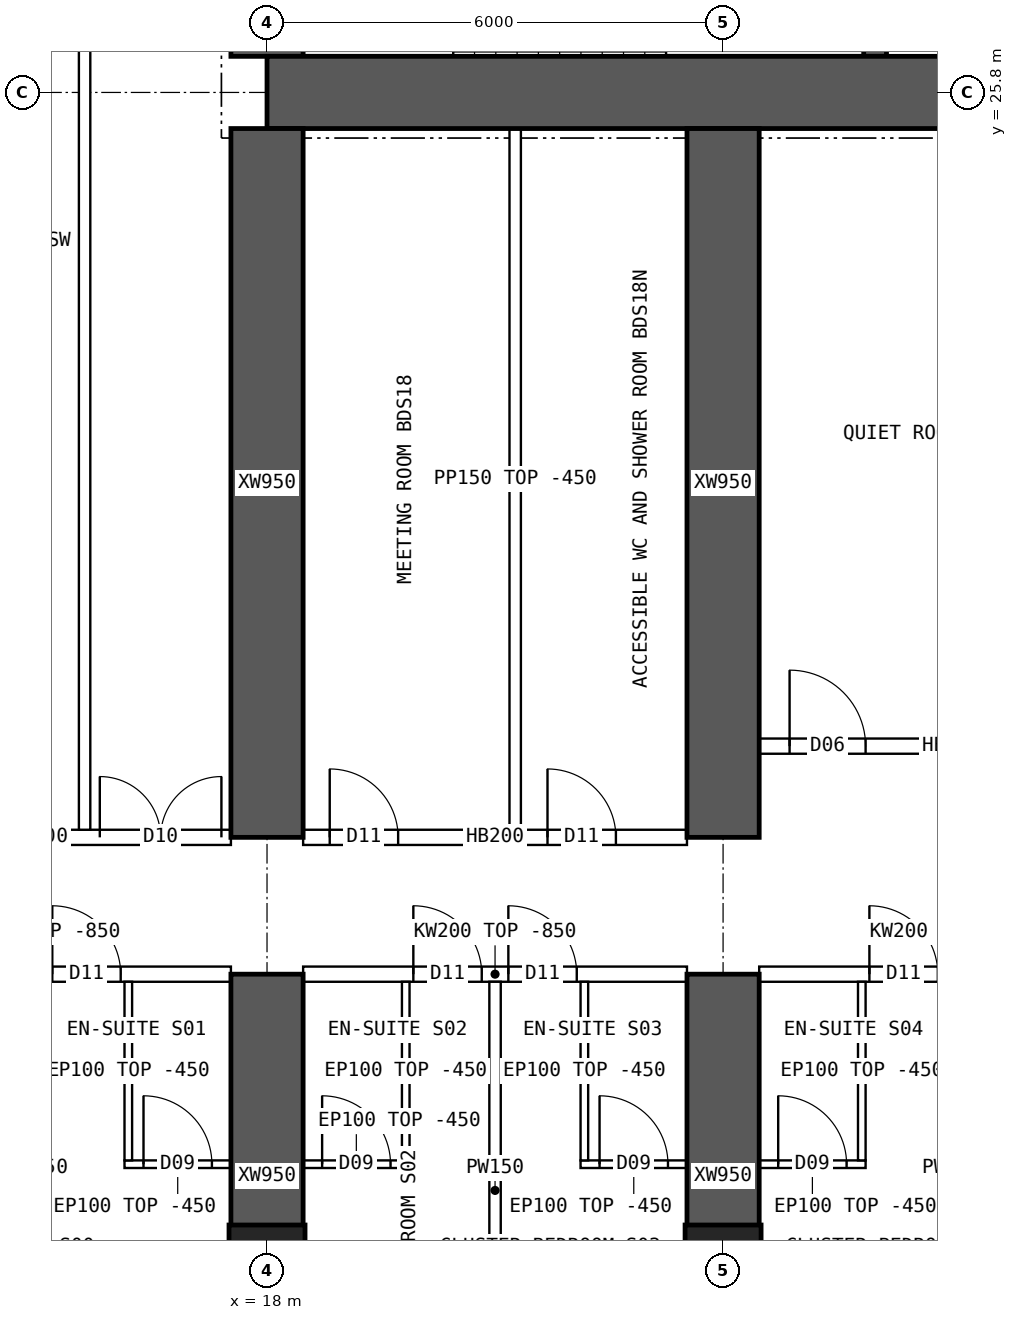
"""IFC4 building model, lengths in metres.
Left out: names, types, materials, properties, quantities, classifications, styles, units other than length and angle.
Written with IfcOpenShell. Run it as: python <this file> out.ifc"""

import sys

from ifc_helpers import new_model, si_unit, direction, frame, frame_2d, origin, origin_2d, place, context, subcontext, project, spatial, polyline, rectangle, hollow_rectangle, outline, extrude, element, fill, save


model = new_model("IFC4")
c1 = context("Model", 3, precision=1e-05, world=origin(), true_north=direction((0.0, 1.0)))
c2 = subcontext(c1, "Body", "Model", "MODEL_VIEW")
j1 = project(units=[si_unit("LENGTHUNIT", "METRE"), si_unit("PLANEANGLEUNIT", "RADIAN")], contexts=[c1])
p1 = place(None, origin())
s1 = spatial("IfcSite", under=j1, at=p1, CompositionType="ELEMENT")
p2 = place(p1, origin())
s2 = spatial("IfcBuilding", under=s1, at=p2, CompositionType="ELEMENT")
p3 = place(p2, frame((0.0, 0.0, 80.65)))
s3 = spatial("IfcBuildingStorey", under=s2, at=p3, CompositionType="ELEMENT", Elevation=80.65)
for number, where, z_axis, x_axis in (
    (1, (18.0, 10.4, 0.0), (0.0, 0.0, 1.0), (1.0, 0.0, 0.0)),
    (2, (24.0, 10.4, 0.0), (0.0, 0.0, 1.0), (1.0, 0.0, 0.0)),
):
    element("IfcColumn", number, at=place(p3, frame(where, z_axis=z_axis, x_axis=x_axis)), inside=s3, PredefinedType="COLUMN", context=c2, shape_type="SweptSolid", body=[
        extrude(hollow_rectangle(XDim=1.0, YDim=1.0, WallThickness=0.1, at=origin_2d()), origin(), (0.0, 0.0, 1.0), 3.75),
    ])
p4 = place(p3, frame((18.0, 25.8, 0.0), z_axis=(0.0, 0.0, 1.0), x_axis=(1.0, 0.0, 0.0)))
e3 = element("IfcWall", 3, at=p4, inside=s3, PredefinedType="SHEAR", context=c2, shape_type="SweptSolid", body=[
    extrude(rectangle(XDim=48.0, YDim=0.95, at=frame_2d((24.0, 0.0))), origin(), (0.0, 0.0, 1.0), 3.75),
])
p5 = place(p3, frame((18.0, 26.275, 0.0), z_axis=(0.0, 0.0, 1.0), x_axis=(0.0, 1.0, 0.0)))
e4 = element("IfcWall", 4, at=p5, inside=s3, PredefinedType="SHEAR", context=c2, shape_type="SweptSolid", body=[
    extrude(rectangle(XDim=11.45, YDim=0.95, at=frame_2d((5.725, 0.0))), origin(), (0.0, 0.0, 1.0), 3.75),
])
p6 = place(p5, frame((5.025, 0.0, 0.0)))
e5 = element("IfcOpeningElement", 5, at=p6, cuts=e4, PredefinedType="OPENING", context=c2, shape_type="SweptSolid", body=[
    extrude(rectangle(XDim=1.2, YDim=2.1, at=frame_2d((0.6, 1.05))), frame((0.0, 0.485, 0.0), z_axis=(0.0, -1.0, 0.0), x_axis=(1.0, 0.0, 0.0)), (0.0, 0.0, 1.0), 0.97),
])
p7 = place(p3, frame((26.0, 26.275, 0.0), z_axis=(0.0, 0.0, 1.0), x_axis=(0.0, 1.0, 0.0)))
e6 = element("IfcWall", 6, at=p7, inside=s3, PredefinedType="SHEAR", context=c2, shape_type="SweptSolid", body=[
    extrude(rectangle(XDim=3.975, YDim=0.3, at=frame_2d((1.988, 0.0))), origin(), (0.0, 0.0, 1.0), 3.75),
])
p8 = place(p3, frame((18.0, 8.9, 0.0), z_axis=(0.0, 0.0, 1.0), x_axis=(0.0, 1.0, 0.0)))
e7 = element("IfcWall", 7, at=p8, inside=s3, PredefinedType="SHEAR", context=c2, shape_type="SweptSolid", body=[
    extrude(rectangle(XDim=5.3, YDim=0.95, at=frame_2d((2.65, 0.0))), origin(), (0.0, 0.0, 1.0), 3.75),
])
p9 = place(p3, frame((18.0, 16.0, 0.0), z_axis=(0.0, 0.0, 1.0), x_axis=(0.0, 1.0, 0.0)))
e8 = element("IfcWall", 8, at=p9, inside=s3, PredefinedType="SHEAR", context=c2, shape_type="SweptSolid", body=[
    extrude(rectangle(XDim=9.325, YDim=0.95, at=frame_2d((4.663, 0.0))), origin(), (0.0, 0.0, 1.0), 3.75),
])
p10 = place(p3, frame((24.0, 8.9, 0.0), z_axis=(0.0, 0.0, 1.0), x_axis=(0.0, 1.0, 0.0)))
e9 = element("IfcWall", 9, at=p10, inside=s3, PredefinedType="SHEAR", context=c2, shape_type="SweptSolid", body=[
    extrude(rectangle(XDim=5.3, YDim=0.95, at=frame_2d((2.65, 0.0))), origin(), (0.0, 0.0, 1.0), 3.75),
])
p11 = place(p3, frame((24.0, 16.0, 0.0), z_axis=(0.0, 0.0, 1.0), x_axis=(0.0, 1.0, 0.0)))
e10 = element("IfcWall", 10, at=p11, inside=s3, PredefinedType="SHEAR", context=c2, shape_type="SweptSolid", body=[
    extrude(rectangle(XDim=9.325, YDim=0.95, at=frame_2d((4.663, 0.0))), origin(), (0.0, 0.0, 1.0), 3.75),
])
p12 = place(p3, frame((12.475, 14.2, 0.0), z_axis=(0.0, 0.0, 1.0), x_axis=(1.0, 0.0, 0.0)))
e11 = element("IfcWall", 11, at=p12, inside=s3, PredefinedType="SOLIDWALL", context=c2, shape_type="SweptSolid", body=[
    extrude(outline(polyline([(0.0, 0.0), (5.05, 0.0), (5.05, 2.9), (0.0, 2.9), (0.0, 0.0)])), frame((0.0, 0.1, 0.0), z_axis=(0.0, -1.0, 0.0), x_axis=(1.0, 0.0, 0.0)), (0.0, 0.0, 1.0), 0.2),
])
p13 = place(p12, frame((1.45, 0.0, 0.0)))
e12 = element("IfcOpeningElement", 12, at=p13, cuts=e11, PredefinedType="OPENING", context=c2, shape_type="SweptSolid", body=[
    extrude(rectangle(XDim=0.9, YDim=2.1, at=frame_2d((0.45, 1.05))), frame((0.0, 0.11, 0.0), z_axis=(0.0, -1.0, 0.0), x_axis=(1.0, 0.0, 0.0)), (0.0, 0.0, 1.0), 0.22),
])
p14 = place(p12, frame((2.7, 0.0, 0.0)))
e13 = element("IfcOpeningElement", 13, at=p14, cuts=e11, PredefinedType="OPENING", context=c2, shape_type="SweptSolid", body=[
    extrude(rectangle(XDim=0.9, YDim=2.1, at=frame_2d((0.45, 1.05))), frame((0.0, 0.11, 0.0), z_axis=(0.0, -1.0, 0.0), x_axis=(1.0, 0.0, 0.0)), (0.0, 0.0, 1.0), 0.22),
])
p15 = place(p3, frame((12.475, 16.0, 0.0), z_axis=(0.0, 0.0, 1.0), x_axis=(1.0, 0.0, 0.0)))
e14 = element("IfcWall", 14, at=p15, inside=s3, PredefinedType="SOLIDWALL", context=c2, shape_type="SweptSolid", body=[
    extrude(rectangle(XDim=5.05, YDim=0.2, at=frame_2d((2.525, 0.0))), origin(), (0.0, 0.0, 1.0), 3.3),
])
p16 = place(p15, frame((3.325, 0.0, 0.0)))
e15 = element("IfcOpeningElement", 15, at=p16, cuts=e14, PredefinedType="OPENING", context=c2, shape_type="SweptSolid", body=[
    extrude(rectangle(XDim=1.6, YDim=2.1, at=frame_2d((0.8, 1.05))), frame((0.0, 0.11, 0.0), z_axis=(0.0, -1.0, 0.0), x_axis=(1.0, 0.0, 0.0)), (0.0, 0.0, 1.0), 0.22),
])
p17 = place(p3, frame((18.475, 14.2, 0.0), z_axis=(0.0, 0.0, 1.0), x_axis=(1.0, 0.0, 0.0)))
e16 = element("IfcWall", 16, at=p17, inside=s3, PredefinedType="SOLIDWALL", context=c2, shape_type="SweptSolid", body=[
    extrude(outline(polyline([(0.0, 0.0), (5.05, 0.0), (5.05, 2.9), (0.0, 2.9), (0.0, 0.0)])), frame((0.0, 0.1, 0.0), z_axis=(0.0, -1.0, 0.0), x_axis=(1.0, 0.0, 0.0)), (0.0, 0.0, 1.0), 0.2),
])
p18 = place(p17, frame((1.45, 0.0, 0.0)))
e17 = element("IfcOpeningElement", 17, at=p18, cuts=e16, PredefinedType="OPENING", context=c2, shape_type="SweptSolid", body=[
    extrude(rectangle(XDim=0.9, YDim=2.1, at=frame_2d((0.45, 1.05))), frame((0.0, 0.11, 0.0), z_axis=(0.0, -1.0, 0.0), x_axis=(1.0, 0.0, 0.0)), (0.0, 0.0, 1.0), 0.22),
])
p19 = place(p17, frame((2.7, 0.0, 0.0)))
e18 = element("IfcOpeningElement", 18, at=p19, cuts=e16, PredefinedType="OPENING", context=c2, shape_type="SweptSolid", body=[
    extrude(rectangle(XDim=0.9, YDim=2.1, at=frame_2d((0.45, 1.05))), frame((0.0, 0.11, 0.0), z_axis=(0.0, -1.0, 0.0), x_axis=(1.0, 0.0, 0.0)), (0.0, 0.0, 1.0), 0.22),
])
p20 = place(p3, frame((18.475, 16.0, 0.0), z_axis=(0.0, 0.0, 1.0), x_axis=(1.0, 0.0, 0.0)))
e19 = element("IfcWall", 19, at=p20, inside=s3, PredefinedType="SOLIDWALL", context=c2, shape_type="SweptSolid", body=[
    extrude(rectangle(XDim=5.05, YDim=0.2, at=frame_2d((2.525, 0.0))), origin(), (0.0, 0.0, 1.0), 3.3),
])
p21 = place(p20, frame((0.35, 0.0, 0.0)))
e20 = element("IfcOpeningElement", 20, at=p21, cuts=e19, PredefinedType="OPENING", context=c2, shape_type="SweptSolid", body=[
    extrude(rectangle(XDim=0.9, YDim=2.1, at=frame_2d((0.45, 1.05))), frame((0.0, 0.11, 0.0), z_axis=(0.0, -1.0, 0.0), x_axis=(1.0, 0.0, 0.0)), (0.0, 0.0, 1.0), 0.22),
])
p22 = place(p20, frame((3.215, 0.0, 0.0)))
e21 = element("IfcOpeningElement", 21, at=p22, cuts=e19, PredefinedType="OPENING", context=c2, shape_type="SweptSolid", body=[
    extrude(rectangle(XDim=0.9, YDim=2.1, at=frame_2d((0.45, 1.05))), frame((0.0, 0.11, 0.0), z_axis=(0.0, -1.0, 0.0), x_axis=(1.0, 0.0, 0.0)), (0.0, 0.0, 1.0), 0.22),
])
p23 = place(p3, frame((24.475, 14.2, 0.0), z_axis=(0.0, 0.0, 1.0), x_axis=(1.0, 0.0, 0.0)))
e22 = element("IfcWall", 22, at=p23, inside=s3, PredefinedType="SOLIDWALL", context=c2, shape_type="SweptSolid", body=[
    extrude(outline(polyline([(0.0, 0.0), (5.05, 0.0), (5.05, 2.9), (0.0, 2.9), (0.0, 0.0)])), frame((0.0, 0.1, 0.0), z_axis=(0.0, -1.0, 0.0), x_axis=(1.0, 0.0, 0.0)), (0.0, 0.0, 1.0), 0.2),
])
p24 = place(p23, frame((1.45, 0.0, 0.0)))
e23 = element("IfcOpeningElement", 23, at=p24, cuts=e22, PredefinedType="OPENING", context=c2, shape_type="SweptSolid", body=[
    extrude(rectangle(XDim=0.9, YDim=2.1, at=frame_2d((0.45, 1.05))), frame((0.0, 0.11, 0.0), z_axis=(0.0, -1.0, 0.0), x_axis=(1.0, 0.0, 0.0)), (0.0, 0.0, 1.0), 0.22),
])
p25 = place(p23, frame((2.7, 0.0, 0.0)))
e24 = element("IfcOpeningElement", 24, at=p25, cuts=e22, PredefinedType="OPENING", context=c2, shape_type="SweptSolid", body=[
    extrude(rectangle(XDim=0.9, YDim=2.1, at=frame_2d((0.45, 1.05))), frame((0.0, 0.11, 0.0), z_axis=(0.0, -1.0, 0.0), x_axis=(1.0, 0.0, 0.0)), (0.0, 0.0, 1.0), 0.22),
])
p26 = place(p3, frame((17.525, 11.7, 0.0), z_axis=(0.0, 0.0, 1.0), x_axis=(-1.0, 0.0, 0.0)))
e25 = element("IfcWall", 25, at=p26, inside=s3, PredefinedType="PARTITIONING", context=c2, shape_type="SweptSolid", body=[
    extrude(rectangle(XDim=1.4, YDim=0.1, at=frame_2d((0.7, 0.0))), origin(), (0.0, 0.0, 1.0), 3.3),
])
p27 = place(p26, frame((0.25, 0.0, 0.0)))
e26 = element("IfcOpeningElement", 26, at=p27, cuts=e25, PredefinedType="OPENING", context=c2, shape_type="SweptSolid", body=[
    extrude(rectangle(XDim=0.9, YDim=2.1, at=frame_2d((0.45, 1.05))), frame((0.0, 0.06, 0.0), z_axis=(0.0, -1.0, 0.0), x_axis=(1.0, 0.0, 0.0)), (0.0, 0.0, 1.0), 0.12),
])
p28 = place(p3, frame((16.175, 11.75, 0.0), z_axis=(0.0, 0.0, 1.0), x_axis=(0.0, 1.0, 0.0)))
e27 = element("IfcWall", 27, at=p28, inside=s3, PredefinedType="PARTITIONING", context=c2, shape_type="SweptSolid", body=[
    extrude(outline(polyline([(0.0, 0.0), (2.35, 0.0), (2.35, 2.9), (2.302, 2.9), (2.3, 3.3), (0.0, 3.3), (0.0, 0.0)])), frame((0.0, 0.05, 0.0), z_axis=(0.0, -1.0, 0.0), x_axis=(1.0, 0.0, 0.0)), (0.0, 0.0, 1.0), 0.1),
])
p29 = place(p3, frame((21.0, 8.61, 0.0), z_axis=(0.0, 0.0, 1.0), x_axis=(0.0, 1.0, 0.0)))
e28 = element("IfcWall", 28, at=p29, inside=s3, PredefinedType="PARTITIONING", context=c2, shape_type="SweptSolid", body=[
    extrude(outline(polyline([(0.0, 0.0), (5.49, 0.0), (5.49, 2.9), (5.442, 2.9), (5.44, 3.3), (1.992, 3.3), (1.99, 2.9), (1.592, 2.9), (1.59, 3.3), (0.0, 3.3), (0.0, 0.0)])), frame((0.0, 0.075, 0.0), z_axis=(0.0, -1.0, 0.0), x_axis=(1.0, 0.0, 0.0)), (0.0, 0.0, 1.0), 0.15),
])
p30 = place(p3, frame((19.875, 11.7, 0.0), z_axis=(0.0, 0.0, 1.0), x_axis=(-1.0, 0.0, 0.0)))
e29 = element("IfcWall", 29, at=p30, inside=s3, PredefinedType="PARTITIONING", context=c2, shape_type="SweptSolid", body=[
    extrude(rectangle(XDim=1.4, YDim=0.1, at=frame_2d((0.7, 0.0))), origin(), (0.0, 0.0, 1.0), 3.3),
])
p31 = place(p30, frame((0.25, 0.0, 0.0)))
e30 = element("IfcOpeningElement", 30, at=p31, cuts=e29, PredefinedType="OPENING", context=c2, shape_type="SweptSolid", body=[
    extrude(rectangle(XDim=0.9, YDim=2.1, at=frame_2d((0.45, 1.05))), frame((0.0, 0.06, 0.0), z_axis=(0.0, -1.0, 0.0), x_axis=(1.0, 0.0, 0.0)), (0.0, 0.0, 1.0), 0.12),
])
p32 = place(p3, frame((19.825, 11.75, 0.0), z_axis=(0.0, 0.0, 1.0), x_axis=(0.0, 1.0, 0.0)))
e31 = element("IfcWall", 31, at=p32, inside=s3, PredefinedType="PARTITIONING", context=c2, shape_type="SweptSolid", body=[
    extrude(outline(polyline([(0.0, 0.0), (2.35, 0.0), (2.35, 2.9), (2.302, 2.9), (2.3, 3.3), (0.0, 3.3), (0.0, 0.0)])), frame((0.0, 0.05, 0.0), z_axis=(0.0, -1.0, 0.0), x_axis=(1.0, 0.0, 0.0)), (0.0, 0.0, 1.0), 0.1),
])
p33 = place(p3, frame((23.525, 11.7, 0.0), z_axis=(0.0, 0.0, 1.0), x_axis=(-1.0, 0.0, 0.0)))
e32 = element("IfcWall", 32, at=p33, inside=s3, PredefinedType="PARTITIONING", context=c2, shape_type="SweptSolid", body=[
    extrude(rectangle(XDim=1.4, YDim=0.1, at=frame_2d((0.7, 0.0))), origin(), (0.0, 0.0, 1.0), 3.3),
])
p34 = place(p33, frame((0.25, 0.0, 0.0)))
e33 = element("IfcOpeningElement", 33, at=p34, cuts=e32, PredefinedType="OPENING", context=c2, shape_type="SweptSolid", body=[
    extrude(rectangle(XDim=0.9, YDim=2.1, at=frame_2d((0.45, 1.05))), frame((0.0, 0.06, 0.0), z_axis=(0.0, -1.0, 0.0), x_axis=(1.0, 0.0, 0.0)), (0.0, 0.0, 1.0), 0.12),
])
p35 = place(p3, frame((22.175, 11.75, 0.0), z_axis=(0.0, 0.0, 1.0), x_axis=(0.0, 1.0, 0.0)))
e34 = element("IfcWall", 34, at=p35, inside=s3, PredefinedType="PARTITIONING", context=c2, shape_type="SweptSolid", body=[
    extrude(outline(polyline([(0.0, 0.0), (2.35, 0.0), (2.35, 2.9), (2.302, 2.9), (2.3, 3.3), (0.0, 3.3), (0.0, 0.0)])), frame((0.0, 0.05, 0.0), z_axis=(0.0, -1.0, 0.0), x_axis=(1.0, 0.0, 0.0)), (0.0, 0.0, 1.0), 0.1),
])
p36 = place(p3, frame((25.875, 11.7, 0.0), z_axis=(0.0, 0.0, 1.0), x_axis=(-1.0, 0.0, 0.0)))
e35 = element("IfcWall", 35, at=p36, inside=s3, PredefinedType="PARTITIONING", context=c2, shape_type="SweptSolid", body=[
    extrude(rectangle(XDim=1.4, YDim=0.1, at=frame_2d((0.7, 0.0))), origin(), (0.0, 0.0, 1.0), 3.3),
])
p37 = place(p36, frame((0.25, 0.0, 0.0)))
e36 = element("IfcOpeningElement", 36, at=p37, cuts=e35, PredefinedType="OPENING", context=c2, shape_type="SweptSolid", body=[
    extrude(rectangle(XDim=0.9, YDim=2.1, at=frame_2d((0.45, 1.05))), frame((0.0, 0.06, 0.0), z_axis=(0.0, -1.0, 0.0), x_axis=(1.0, 0.0, 0.0)), (0.0, 0.0, 1.0), 0.12),
])
p38 = place(p3, frame((25.825, 11.75, 0.0), z_axis=(0.0, 0.0, 1.0), x_axis=(0.0, 1.0, 0.0)))
e37 = element("IfcWall", 37, at=p38, inside=s3, PredefinedType="PARTITIONING", context=c2, shape_type="SweptSolid", body=[
    extrude(outline(polyline([(0.0, 0.0), (2.35, 0.0), (2.35, 2.9), (2.302, 2.9), (2.3, 3.3), (0.0, 3.3), (0.0, 0.0)])), frame((0.0, 0.05, 0.0), z_axis=(0.0, -1.0, 0.0), x_axis=(1.0, 0.0, 0.0)), (0.0, 0.0, 1.0), 0.1),
])
p39 = place(p3, frame((21.265, 16.1, 0.0), z_axis=(0.0, 0.0, 1.0), x_axis=(0.0, 1.0, 0.0)))
e38 = element("IfcWall", 38, at=p39, inside=s3, PredefinedType="PARTITIONING", context=c2, shape_type="SweptSolid", body=[
    extrude(rectangle(XDim=9.225, YDim=0.15, at=frame_2d((4.612, 0.0))), origin(), (0.0, 0.0, 1.0), 3.3),
])
p40 = place(p3, frame((24.475, 17.2, 0.0), z_axis=(0.0, 0.0, 1.0), x_axis=(1.0, 0.0, 0.0)))
e39 = element("IfcWall", 39, at=p40, inside=s3, PredefinedType="SOLIDWALL", context=c2, shape_type="SweptSolid", body=[
    extrude(rectangle(XDim=5.05, YDim=0.2, at=frame_2d((2.525, 0.0))), origin(), (0.0, 0.0, 1.0), 3.3),
])
p41 = place(p40, frame((0.4, 0.0, 0.0)))
e40 = element("IfcOpeningElement", 40, at=p41, cuts=e39, PredefinedType="OPENING", context=c2, shape_type="SweptSolid", body=[
    extrude(rectangle(XDim=1.0, YDim=2.1, at=frame_2d((0.5, 1.05))), frame((0.0, 0.11, 0.0), z_axis=(0.0, -1.0, 0.0), x_axis=(1.0, 0.0, 0.0)), (0.0, 0.0, 1.0), 0.22),
])
p42 = place(p3, frame((15.6, 16.1, 0.0), z_axis=(0.0, 0.0, 1.0), x_axis=(0.0, 1.0, 0.0)))
e41 = element("IfcWall", 41, at=p42, inside=s3, PredefinedType="PARTITIONING", context=c2, shape_type="SweptSolid", body=[
    extrude(rectangle(XDim=31.8, YDim=0.15, at=frame_2d((15.9, 0.0))), origin(), (0.0, 0.0, 1.0), 3.3),
])
p43 = place(p42, frame((13.5, 0.0, 0.0)))
e42 = element("IfcOpeningElement", 42, at=p43, cuts=e41, PredefinedType="OPENING", context=c2, shape_type="SweptSolid", body=[
    extrude(rectangle(XDim=1.0, YDim=2.1, at=frame_2d((0.5, 1.05))), frame((0.0, 0.085, 0.0), z_axis=(0.0, -1.0, 0.0), x_axis=(1.0, 0.0, 0.0)), (0.0, 0.0, 1.0), 0.17),
])
p44 = place(p42, frame((16.5, 0.0, 0.0)))
e43 = element("IfcOpeningElement", 43, at=p44, cuts=e41, PredefinedType="OPENING", context=c2, shape_type="SweptSolid", body=[
    extrude(rectangle(XDim=1.0, YDim=2.1, at=frame_2d((0.5, 1.05))), frame((0.0, 0.085, 0.0), z_axis=(0.0, -1.0, 0.0), x_axis=(1.0, 0.0, 0.0)), (0.0, 0.0, 1.0), 0.17),
])
p45 = place(p16, origin())
e44 = element("IfcDoor", 44, at=p45, inside=s3, OperationType="DOUBLE_DOOR_SINGLE_SWING", PredefinedType="DOOR", context=c2, shape_type="SweptSolid", body=[
    extrude(rectangle(XDim=1.6, YDim=2.1, at=frame_2d((0.8, 1.05))), frame((0.0, 0.025, 0.0), z_axis=(0.0, -1.0, 0.0), x_axis=(1.0, 0.0, 0.0)), (0.0, 0.0, 1.0), 0.05),
])
fill(e15, e44)
p46 = place(p27, origin())
e45 = element("IfcDoor", 45, at=p46, inside=s3, OperationType="SINGLE_SWING_RIGHT", PredefinedType="DOOR", context=c2, shape_type="SweptSolid", body=[
    extrude(rectangle(XDim=0.9, YDim=2.1, at=frame_2d((0.45, 1.05))), frame((0.0, 0.025, 0.0), z_axis=(0.0, -1.0, 0.0), x_axis=(1.0, 0.0, 0.0)), (0.0, 0.0, 1.0), 0.05),
])
fill(e26, e45)
p47 = place(p14, origin())
e46 = element("IfcDoor", 46, at=p47, inside=s3, OperationType="SINGLE_SWING_LEFT", PredefinedType="DOOR", context=c2, shape_type="SweptSolid", body=[
    extrude(rectangle(XDim=0.9, YDim=2.1, at=frame_2d((0.45, 1.05))), frame((0.0, 0.025, 0.0), z_axis=(0.0, -1.0, 0.0), x_axis=(1.0, 0.0, 0.0)), (0.0, 0.0, 1.0), 0.05),
])
fill(e13, e46)
p48 = place(p31, origin())
e47 = element("IfcDoor", 47, at=p48, inside=s3, OperationType="SINGLE_SWING_RIGHT", PredefinedType="DOOR", context=c2, shape_type="SweptSolid", body=[
    extrude(rectangle(XDim=0.9, YDim=2.1, at=frame_2d((0.45, 1.05))), frame((0.0, 0.025, 0.0), z_axis=(0.0, -1.0, 0.0), x_axis=(1.0, 0.0, 0.0)), (0.0, 0.0, 1.0), 0.05),
])
fill(e30, e47)
p49 = place(p18, origin())
e48 = element("IfcDoor", 48, at=p49, inside=s3, OperationType="SINGLE_SWING_LEFT", PredefinedType="DOOR", context=c2, shape_type="SweptSolid", body=[
    extrude(rectangle(XDim=0.9, YDim=2.1, at=frame_2d((0.45, 1.05))), frame((0.0, 0.025, 0.0), z_axis=(0.0, -1.0, 0.0), x_axis=(1.0, 0.0, 0.0)), (0.0, 0.0, 1.0), 0.05),
])
fill(e17, e48)
p50 = place(p34, origin())
e49 = element("IfcDoor", 49, at=p50, inside=s3, OperationType="SINGLE_SWING_RIGHT", PredefinedType="DOOR", context=c2, shape_type="SweptSolid", body=[
    extrude(rectangle(XDim=0.9, YDim=2.1, at=frame_2d((0.45, 1.05))), frame((0.0, 0.025, 0.0), z_axis=(0.0, -1.0, 0.0), x_axis=(1.0, 0.0, 0.0)), (0.0, 0.0, 1.0), 0.05),
])
fill(e33, e49)
p51 = place(p19, origin())
e50 = element("IfcDoor", 50, at=p51, inside=s3, OperationType="SINGLE_SWING_LEFT", PredefinedType="DOOR", context=c2, shape_type="SweptSolid", body=[
    extrude(rectangle(XDim=0.9, YDim=2.1, at=frame_2d((0.45, 1.05))), frame((0.0, 0.025, 0.0), z_axis=(0.0, -1.0, 0.0), x_axis=(1.0, 0.0, 0.0)), (0.0, 0.0, 1.0), 0.05),
])
fill(e18, e50)
p52 = place(p37, origin())
e51 = element("IfcDoor", 51, at=p52, inside=s3, OperationType="SINGLE_SWING_RIGHT", PredefinedType="DOOR", context=c2, shape_type="SweptSolid", body=[
    extrude(rectangle(XDim=0.9, YDim=2.1, at=frame_2d((0.45, 1.05))), frame((0.0, 0.025, 0.0), z_axis=(0.0, -1.0, 0.0), x_axis=(1.0, 0.0, 0.0)), (0.0, 0.0, 1.0), 0.05),
])
fill(e36, e51)
p53 = place(p24, origin())
e52 = element("IfcDoor", 52, at=p53, inside=s3, OperationType="SINGLE_SWING_LEFT", PredefinedType="DOOR", context=c2, shape_type="SweptSolid", body=[
    extrude(rectangle(XDim=0.9, YDim=2.1, at=frame_2d((0.45, 1.05))), frame((0.0, 0.025, 0.0), z_axis=(0.0, -1.0, 0.0), x_axis=(1.0, 0.0, 0.0)), (0.0, 0.0, 1.0), 0.05),
])
fill(e23, e52)
p54 = place(p21, origin())
e53 = element("IfcDoor", 53, at=p54, inside=s3, OperationType="SINGLE_SWING_LEFT", PredefinedType="DOOR", context=c2, shape_type="SweptSolid", body=[
    extrude(rectangle(XDim=0.9, YDim=2.1, at=frame_2d((0.45, 1.05))), frame((0.0, 0.025, 0.0), z_axis=(0.0, -1.0, 0.0), x_axis=(1.0, 0.0, 0.0)), (0.0, 0.0, 1.0), 0.05),
])
fill(e20, e53)
p55 = place(p22, origin())
e54 = element("IfcDoor", 54, at=p55, inside=s3, OperationType="SINGLE_SWING_LEFT", PredefinedType="DOOR", context=c2, shape_type="SweptSolid", body=[
    extrude(rectangle(XDim=0.9, YDim=2.1, at=frame_2d((0.45, 1.05))), frame((0.0, 0.025, 0.0), z_axis=(0.0, -1.0, 0.0), x_axis=(1.0, 0.0, 0.0)), (0.0, 0.0, 1.0), 0.05),
])
fill(e21, e54)
p56 = place(p41, origin())
e55 = element("IfcDoor", 55, at=p56, inside=s3, OperationType="SINGLE_SWING_LEFT", PredefinedType="DOOR", context=c2, shape_type="SweptSolid", body=[
    extrude(rectangle(XDim=1.0, YDim=2.1, at=frame_2d((0.5, 1.05))), frame((0.0, 0.025, 0.0), z_axis=(0.0, -1.0, 0.0), x_axis=(1.0, 0.0, 0.0)), (0.0, 0.0, 1.0), 0.05),
])
fill(e40, e55)
save(model, sys.argv[1])
